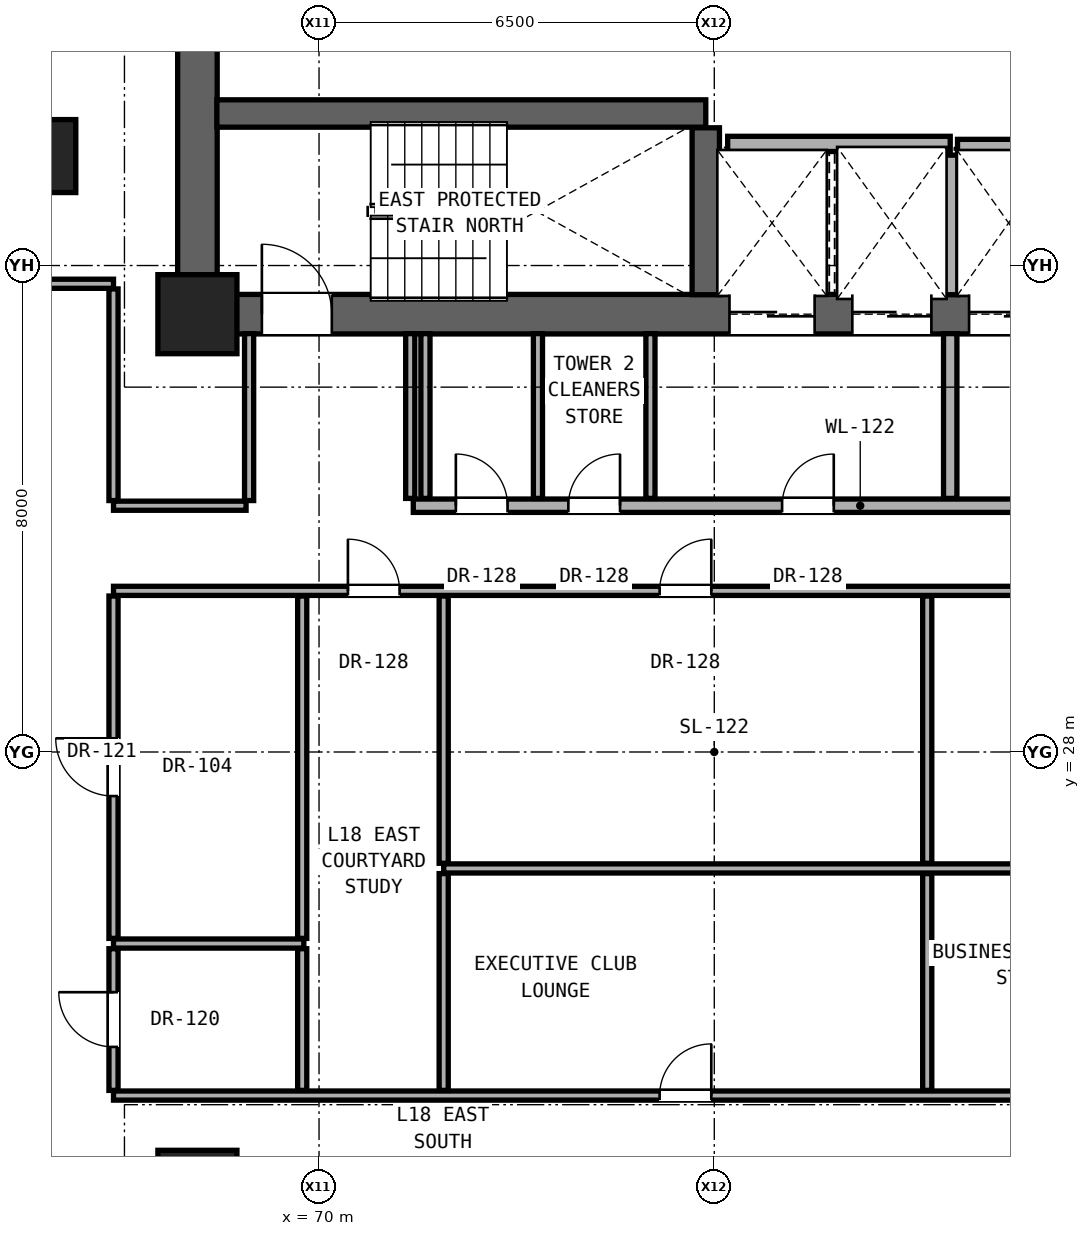
"""IFC4 building model, lengths in metres.
Left out: names, types, materials, properties, quantities, classifications, styles, units other than length and angle.
Written with IfcOpenShell. Run it as: python <this file> out.ifc"""

import sys

from ifc_helpers import new_model, si_unit, direction, frame, frame_2d, origin, origin_2d, place, context, subcontext, project, spatial, rectangle, extrude, element, fill, save


model = new_model("IFC4")
c1 = context("Model", 3, precision=1e-05, world=origin(), true_north=direction((0.0, 1.0)))
c2 = subcontext(c1, "Body", "Model", "MODEL_VIEW")
j1 = project(units=[si_unit("LENGTHUNIT", "METRE"), si_unit("PLANEANGLEUNIT", "RADIAN")], contexts=[c1])
p1 = place(None, origin())
s1 = spatial("IfcSite", under=j1, at=p1, CompositionType="ELEMENT")
p2 = place(p1, origin())
s2 = spatial("IfcBuilding", under=s1, at=p2, CompositionType="ELEMENT")
p3 = place(p2, frame((0.0, 0.0, 65.3)))
s3 = spatial("IfcBuildingStorey", under=s2, at=p3, CompositionType="ELEMENT", Elevation=65.3)
for number, where, z_axis, x_axis in (
    (1, (68.0, 20.8, 0.0), (0.0, 0.0, 1.0), (1.0, 0.0, 0.0)),
    (2, (68.0, 35.2, 0.0), (0.0, 0.0, 1.0), (1.0, 0.0, 0.0)),
):
    element("IfcColumn", number, at=place(p3, frame(where, z_axis=z_axis, x_axis=x_axis)), inside=s3, PredefinedType="COLUMN", context=c2, shape_type="SweptSolid", body=[
        extrude(rectangle(XDim=1.3, YDim=1.3, at=origin_2d()), origin(), (0.0, 0.0, 1.0), 3.3),
    ])
p4 = place(p3, frame((65.6, 37.8, 0.0), z_axis=(0.0, 0.0, 1.0), x_axis=(1.0, 0.0, 0.0)))
e3 = element("IfcColumn", 3, at=p4, inside=s3, PredefinedType="PILASTER", context=c2, shape_type="SweptSolid", body=[
    extrude(rectangle(XDim=0.8, YDim=1.2, at=origin_2d()), origin(), (0.0, 0.0, 1.0), 3.3),
])
p5 = place(p3, frame((68.0, 35.2, 0.0), z_axis=(0.0, 0.0, 1.0), x_axis=(0.0, 1.0, 0.0)))
e4 = element("IfcWall", 4, at=p5, inside=s3, PredefinedType="SHEAR", context=c2, shape_type="SweptSolid", body=[
    extrude(rectangle(XDim=5.6, YDim=0.65, at=frame_2d((2.8, 0.0))), origin(), (0.0, 0.0, 1.0), 3.06),
])
p6 = place(p3, frame((68.0, 35.2, 0.0), z_axis=(0.0, 0.0, 1.0), x_axis=(1.0, 0.0, 0.0)))
e5 = element("IfcWall", 5, at=p6, inside=s3, PredefinedType="SHEAR", context=c2, shape_type="SweptSolid", body=[
    extrude(rectangle(XDim=17.0, YDim=0.65, at=frame_2d((8.5, 0.0))), origin(), (0.0, 0.0, 1.0), 3.06),
])
p7 = place(p6, frame((1.06, 0.0, 0.0)))
e6 = element("IfcOpeningElement", 6, at=p7, cuts=e5, PredefinedType="OPENING", context=c2, shape_type="SweptSolid", body=[
    extrude(rectangle(XDim=1.15, YDim=2.2, at=frame_2d((0.575, 1.1))), frame((0.0, 0.335, 0.0), z_axis=(0.0, -1.0, 0.0), x_axis=(1.0, 0.0, 0.0)), (0.0, 0.0, 1.0), 0.67),
])
p8 = place(p6, frame((8.75, 0.0, 0.0)))
e7 = element("IfcOpeningElement", 7, at=p8, cuts=e5, PredefinedType="OPENING", context=c2, shape_type="SweptSolid", body=[
    extrude(rectangle(XDim=1.4, YDim=2.35, at=frame_2d((0.7, 1.175))), frame((0.0, 0.335, 0.0), z_axis=(0.0, -1.0, 0.0), x_axis=(1.0, 0.0, 0.0)), (0.0, 0.0, 1.0), 0.67),
])
p9 = place(p6, frame((10.77, 0.0, 0.0)))
e8 = element("IfcOpeningElement", 8, at=p9, cuts=e5, PredefinedType="OPENING", context=c2, shape_type="SweptSolid", body=[
    extrude(rectangle(XDim=1.3, YDim=2.3, at=frame_2d((0.65, 1.15))), frame((0.0, 0.335, 0.0), z_axis=(0.0, -1.0, 0.0), x_axis=(1.0, 0.0, 0.0)), (0.0, 0.0, 1.0), 0.67),
])
p10 = place(p6, frame((12.69, 0.0, 0.0)))
e9 = element("IfcOpeningElement", 9, at=p10, cuts=e5, PredefinedType="OPENING", context=c2, shape_type="SweptSolid", body=[
    extrude(rectangle(XDim=1.3, YDim=2.3, at=frame_2d((0.65, 1.15))), frame((0.0, 0.335, 0.0), z_axis=(0.0, -1.0, 0.0), x_axis=(1.0, 0.0, 0.0)), (0.0, 0.0, 1.0), 0.67),
])
p11 = place(p6, frame((14.57, 0.0, 0.0)))
e10 = element("IfcOpeningElement", 10, at=p11, cuts=e5, PredefinedType="OPENING", context=c2, shape_type="SweptSolid", body=[
    extrude(rectangle(XDim=1.3, YDim=2.3, at=frame_2d((0.65, 1.15))), frame((0.0, 0.335, 0.0), z_axis=(0.0, -1.0, 0.0), x_axis=(1.0, 0.0, 0.0)), (0.0, 0.0, 1.0), 0.67),
])
p12 = place(p3, frame((66.62, 22.35, 0.0), z_axis=(0.0, 0.0, 1.0), x_axis=(1.0, 0.0, 0.0)))
e11 = element("IfcWall", 11, at=p12, inside=s3, PredefinedType="PARTITIONING", context=c2, shape_type="SweptSolid", body=[
    extrude(rectangle(XDim=19.63, YDim=0.15, at=frame_2d((9.815, 0.0))), origin(), (0.0, 0.0, 1.0), 2.125),
])
p13 = place(p12, frame((8.981, 0.0, 0.0)))
e12 = element("IfcOpeningElement", 12, at=p13, cuts=e11, PredefinedType="OPENING", context=c2, shape_type="SweptSolid", body=[
    extrude(rectangle(XDim=0.85, YDim=2.01, at=frame_2d((0.425, 1.005))), frame((0.0, 0.085, 0.0), z_axis=(0.0, -1.0, 0.0), x_axis=(1.0, 0.0, 0.0)), (0.0, 0.0, 1.0), 0.17),
])
p14 = place(p12, frame((16.061, 0.0, 0.0)))
e13 = element("IfcOpeningElement", 13, at=p14, cuts=e11, PredefinedType="OPENING", context=c2, shape_type="SweptSolid", body=[
    extrude(rectangle(XDim=0.85, YDim=2.01, at=frame_2d((0.425, 1.005))), frame((0.0, 0.085, 0.0), z_axis=(0.0, -1.0, 0.0), x_axis=(1.0, 0.0, 0.0)), (0.0, 0.0, 1.0), 0.17),
])
p15 = place(p3, frame((66.62, 24.85, 0.0), z_axis=(0.0, 0.0, 1.0), x_axis=(1.0, 0.0, 0.0)))
e14 = element("IfcWall", 14, at=p15, inside=s3, PredefinedType="PARTITIONING", context=c2, shape_type="SweptSolid", body=[
    extrude(rectangle(XDim=3.13, YDim=0.15, at=frame_2d((1.565, 0.0))), origin(), (0.0, 0.0, 1.0), 2.125),
])
p16 = place(p3, frame((72.05, 26.085, 0.0), z_axis=(0.0, 0.0, 1.0), x_axis=(1.0, 0.0, 0.0)))
e15 = element("IfcWall", 15, at=p16, inside=s3, PredefinedType="PARTITIONING", context=c2, shape_type="SweptSolid", body=[
    extrude(rectangle(XDim=14.2, YDim=0.15, at=frame_2d((7.1, 0.0))), origin(), (0.0, 0.0, 1.0), 2.125),
])
p17 = place(p3, frame((66.62, 30.65, 0.0), z_axis=(0.0, 0.0, 1.0), x_axis=(1.0, 0.0, 0.0)))
e16 = element("IfcWall", 16, at=p17, inside=s3, PredefinedType="PARTITIONING", context=c2, shape_type="SweptSolid", body=[
    extrude(rectangle(XDim=19.63, YDim=0.15, at=frame_2d((9.815, 0.0))), origin(), (0.0, 0.0, 1.0), 2.125),
])
p18 = place(p17, frame((3.855, 0.0, 0.0)))
e17 = element("IfcOpeningElement", 17, at=p18, cuts=e16, PredefinedType="OPENING", context=c2, shape_type="SweptSolid", body=[
    extrude(rectangle(XDim=0.85, YDim=2.01, at=frame_2d((0.425, 1.005))), frame((0.0, 0.085, 0.0), z_axis=(0.0, -1.0, 0.0), x_axis=(1.0, 0.0, 0.0)), (0.0, 0.0, 1.0), 0.17),
])
p19 = place(p17, frame((8.981, 0.0, 0.0)))
e18 = element("IfcOpeningElement", 18, at=p19, cuts=e16, PredefinedType="OPENING", context=c2, shape_type="SweptSolid", body=[
    extrude(rectangle(XDim=0.85, YDim=2.01, at=frame_2d((0.425, 1.005))), frame((0.0, 0.085, 0.0), z_axis=(0.0, -1.0, 0.0), x_axis=(1.0, 0.0, 0.0)), (0.0, 0.0, 1.0), 0.17),
])
p20 = place(p17, frame((16.061, 0.0, 0.0)))
e19 = element("IfcOpeningElement", 19, at=p20, cuts=e16, PredefinedType="OPENING", context=c2, shape_type="SweptSolid", body=[
    extrude(rectangle(XDim=0.85, YDim=2.01, at=frame_2d((0.425, 1.005))), frame((0.0, 0.085, 0.0), z_axis=(0.0, -1.0, 0.0), x_axis=(1.0, 0.0, 0.0)), (0.0, 0.0, 1.0), 0.17),
])
p21 = place(p3, frame((66.62, 32.05, 0.0), z_axis=(0.0, 0.0, 1.0), x_axis=(1.0, 0.0, 0.0)))
e20 = element("IfcWall", 20, at=p21, inside=s3, PredefinedType="PARTITIONING", context=c2, shape_type="SweptSolid", body=[
    extrude(rectangle(XDim=2.18, YDim=0.15, at=frame_2d((1.09, 0.0))), origin(), (0.0, 0.0, 1.0), 2.125),
])
p22 = place(p3, frame((71.55, 32.05, 0.0), z_axis=(0.0, 0.0, 1.0), x_axis=(1.0, 0.0, 0.0)))
e21 = element("IfcWall", 21, at=p22, inside=s3, PredefinedType="SOLIDWALL", context=c2, shape_type="SweptSolid", body=[
    extrude(rectangle(XDim=14.7, YDim=0.22, at=frame_2d((7.35, 0.0))), origin(), (0.0, 0.0, 1.0), 2.125),
])
p23 = place(p22, frame((11.39, 0.0, 0.0)))
e22 = element("IfcOpeningElement", 22, at=p23, cuts=e21, PredefinedType="OPENING", context=c2, shape_type="SweptSolid", body=[
    extrude(rectangle(XDim=0.85, YDim=2.01, at=frame_2d((0.425, 1.005))), frame((0.0, 0.12, 0.0), z_axis=(0.0, -1.0, 0.0), x_axis=(1.0, 0.0, 0.0)), (0.0, 0.0, 1.0), 0.24),
])
p24 = place(p22, frame((6.065, 0.0, 0.0)))
e23 = element("IfcOpeningElement", 23, at=p24, cuts=e21, PredefinedType="OPENING", context=c2, shape_type="SweptSolid", body=[
    extrude(rectangle(XDim=0.85, YDim=2.01, at=frame_2d((0.425, 1.005))), frame((0.0, 0.12, 0.0), z_axis=(0.0, -1.0, 0.0), x_axis=(1.0, 0.0, 0.0)), (0.0, 0.0, 1.0), 0.24),
])
p25 = place(p22, frame((0.7, 0.0, 0.0)))
e24 = element("IfcOpeningElement", 24, at=p25, cuts=e21, PredefinedType="OPENING", context=c2, shape_type="SweptSolid", body=[
    extrude(rectangle(XDim=0.85, YDim=2.01, at=frame_2d((0.425, 1.005))), frame((0.0, 0.12, 0.0), z_axis=(0.0, -1.0, 0.0), x_axis=(1.0, 0.0, 0.0)), (0.0, 0.0, 1.0), 0.24),
])
p26 = place(p22, frame((2.55, 0.0, 0.0)))
e25 = element("IfcOpeningElement", 25, at=p26, cuts=e21, PredefinedType="OPENING", context=c2, shape_type="SweptSolid", body=[
    extrude(rectangle(XDim=0.85, YDim=2.01, at=frame_2d((0.425, 1.005))), frame((0.0, 0.12, 0.0), z_axis=(0.0, -1.0, 0.0), x_axis=(1.0, 0.0, 0.0)), (0.0, 0.0, 1.0), 0.24),
])
p27 = place(p3, frame((65.25, 35.7, 0.0), z_axis=(0.0, 0.0, 1.0), x_axis=(1.0, 0.0, 0.0)))
e26 = element("IfcWall", 26, at=p27, inside=s3, PredefinedType="PARTITIONING", context=c2, shape_type="SweptSolid", body=[
    extrude(rectangle(XDim=1.37, YDim=0.15, at=frame_2d((0.685, 0.0))), origin(), (0.0, 0.0, 1.0), 3.06),
])
p28 = place(p3, frame((80.5, 37.95, 0.0), z_axis=(0.0, 0.0, 1.0), x_axis=(1.0, 0.0, 0.0)))
e27 = element("IfcWall", 27, at=p28, inside=s3, PredefinedType="SOLIDWALL", context=c2, shape_type="SweptSolid", body=[
    extrude(rectangle(XDim=3.65, YDim=0.25, at=frame_2d((1.825, 0.0))), origin(), (0.0, 0.0, 1.0), 3.06),
])
p29 = place(p3, frame((76.72, 38.0, 0.0), z_axis=(0.0, 0.0, 1.0), x_axis=(1.0, 0.0, 0.0)))
e28 = element("IfcWall", 28, at=p29, inside=s3, PredefinedType="SOLIDWALL", context=c2, shape_type="SweptSolid", body=[
    extrude(rectangle(XDim=3.66, YDim=0.25, at=frame_2d((1.83, 0.0))), origin(), (0.0, 0.0, 1.0), 3.06),
])
p30 = place(p3, frame((68.32, 38.5, 0.0), z_axis=(0.0, 0.0, 1.0), x_axis=(1.0, 0.0, 0.0)))
e29 = element("IfcWall", 29, at=p30, inside=s3, PredefinedType="SHEAR", context=c2, shape_type="SweptSolid", body=[
    extrude(rectangle(XDim=8.04, YDim=0.45, at=frame_2d((4.02, 0.0))), origin(), (0.0, 0.0, 1.0), 3.06),
])
p31 = place(p3, frame((66.62, 22.435, 0.0), z_axis=(0.0, 0.0, 1.0), x_axis=(0.0, 1.0, 0.0)))
e30 = element("IfcWall", 30, at=p31, inside=s3, PredefinedType="PARTITIONING", context=c2, shape_type="SweptSolid", body=[
    extrude(rectangle(XDim=2.33, YDim=0.15, at=frame_2d((1.165, 0.0))), origin(), (0.0, 0.0, 1.0), 3.06),
])
p32 = place(p31, frame((0.715, 0.0, 0.0)))
e31 = element("IfcOpeningElement", 31, at=p32, cuts=e30, PredefinedType="OPENING", context=c2, shape_type="SweptSolid", body=[
    extrude(rectangle(XDim=0.9, YDim=2.1, at=frame_2d((0.45, 1.05))), frame((0.0, 0.085, 0.0), z_axis=(0.0, -1.0, 0.0), x_axis=(1.0, 0.0, 0.0)), (0.0, 0.0, 1.0), 0.17),
])
p33 = place(p3, frame((66.62, 24.935, 0.0), z_axis=(0.0, 0.0, 1.0), x_axis=(0.0, 1.0, 0.0)))
e32 = element("IfcWall", 32, at=p33, inside=s3, PredefinedType="PARTITIONING", context=c2, shape_type="SweptSolid", body=[
    extrude(rectangle(XDim=5.63, YDim=0.15, at=frame_2d((2.815, 0.0))), origin(), (0.0, 0.0, 1.0), 2.279),
])
p34 = place(p33, frame((2.34, 0.0, 0.0)))
e33 = element("IfcOpeningElement", 33, at=p34, cuts=e32, PredefinedType="OPENING", context=c2, shape_type="SweptSolid", body=[
    extrude(rectangle(XDim=0.95, YDim=2.15, at=frame_2d((0.475, 1.075))), frame((0.0, 0.085, 0.0), z_axis=(0.0, -1.0, 0.0), x_axis=(1.0, 0.0, 0.0)), (0.0, 0.0, 1.0), 0.17),
])
p35 = place(p3, frame((66.62, 32.135, 0.0), z_axis=(0.0, 0.0, 1.0), x_axis=(0.0, 1.0, 0.0)))
e34 = element("IfcWall", 34, at=p35, inside=s3, PredefinedType="PARTITIONING", context=c2, shape_type="SweptSolid", body=[
    extrude(rectangle(XDim=3.48, YDim=0.15, at=frame_2d((1.74, 0.0))), origin(), (0.0, 0.0, 1.0), 2.452),
])
p36 = place(p3, frame((68.85, 32.135, 0.0), z_axis=(0.0, 0.0, 1.0), x_axis=(0.0, 1.0, 0.0)))
e35 = element("IfcWall", 35, at=p36, inside=s3, PredefinedType="PARTITIONING", context=c2, shape_type="SweptSolid", body=[
    extrude(rectangle(XDim=2.745, YDim=0.15, at=frame_2d((1.373, 0.0))), origin(), (0.0, 0.0, 1.0), 3.06),
])
p37 = place(p3, frame((69.723, 22.435, 0.0), z_axis=(0.0, 0.0, 1.0), x_axis=(0.0, 1.0, 0.0)))
e36 = element("IfcWall", 36, at=p37, inside=s3, PredefinedType="PARTITIONING", context=c2, shape_type="SweptSolid", body=[
    extrude(rectangle(XDim=2.33, YDim=0.15, at=frame_2d((1.165, 0.0))), origin(), (0.0, 0.0, 1.0), 3.06),
])
p38 = place(p3, frame((69.723, 24.935, 0.0), z_axis=(0.0, 0.0, 1.0), x_axis=(0.0, 1.0, 0.0)))
e37 = element("IfcWall", 37, at=p38, inside=s3, PredefinedType="PARTITIONING", context=c2, shape_type="SweptSolid", body=[
    extrude(rectangle(XDim=5.63, YDim=0.15, at=frame_2d((2.815, 0.0))), origin(), (0.0, 0.0, 1.0), 2.125),
])
for number, where, z_axis, x_axis in (
    (38, (71.5, 32.17, 0.0), (0.0, 0.0, 1.0), (0.0, 1.0, 0.0)),
    (39, (71.75, 32.17, 0.0), (0.0, 0.0, 1.0), (0.0, 1.0, 0.0)),
):
    element("IfcWall", number, at=place(p3, frame(where, z_axis=z_axis, x_axis=x_axis)), inside=s3, PredefinedType="PARTITIONING", context=c2, shape_type="SweptSolid", body=[
        extrude(rectangle(XDim=2.71, YDim=0.15, at=frame_2d((1.355, 0.0))), origin(), (0.0, 0.0, 1.0), 3.06),
    ])
p39 = place(p3, frame((72.05, 22.435, 0.0), z_axis=(0.0, 0.0, 1.0), x_axis=(0.0, 1.0, 0.0)))
e40 = element("IfcWall", 40, at=p39, inside=s3, PredefinedType="PARTITIONING", context=c2, shape_type="SweptSolid", body=[
    extrude(rectangle(XDim=3.565, YDim=0.15, at=frame_2d((1.782, 0.0))), origin(), (0.0, 0.0, 1.0), 2.589),
])
p40 = place(p3, frame((72.05, 26.17, 0.0), z_axis=(0.0, 0.0, 1.0), x_axis=(0.0, 1.0, 0.0)))
e41 = element("IfcWall", 41, at=p40, inside=s3, PredefinedType="PARTITIONING", context=c2, shape_type="SweptSolid", body=[
    extrude(rectangle(XDim=4.395, YDim=0.15, at=frame_2d((2.198, 0.0))), origin(), (0.0, 0.0, 1.0), 2.125),
])
for number, where, z_axis, x_axis in (
    (42, (73.6, 32.17, 0.0), (0.0, 0.0, 1.0), (0.0, 1.0, 0.0)),
    (43, (75.45, 32.17, 0.0), (0.0, 0.0, 1.0), (0.0, 1.0, 0.0)),
):
    element("IfcWall", number, at=place(p3, frame(where, z_axis=z_axis, x_axis=x_axis)), inside=s3, PredefinedType="PARTITIONING", context=c2, shape_type="SweptSolid", body=[
        extrude(rectangle(XDim=2.71, YDim=0.15, at=frame_2d((1.355, 0.0))), origin(), (0.0, 0.0, 1.0), 3.06),
    ])
p41 = place(p3, frame((76.36, 35.52, 0.0), z_axis=(0.0, 0.0, 1.0), x_axis=(0.0, 1.0, 0.0)))
e44 = element("IfcWall", 44, at=p41, inside=s3, PredefinedType="SHEAR", context=c2, shape_type="SweptSolid", body=[
    extrude(rectangle(XDim=2.745, YDim=0.45, at=frame_2d((1.373, 0.0))), origin(), (0.0, 0.0, 1.0), 3.06),
])
p42 = place(p3, frame((80.002, 22.435, 0.0), z_axis=(0.0, 0.0, 1.0), x_axis=(0.0, 1.0, 0.0)))
e45 = element("IfcWall", 45, at=p42, inside=s3, PredefinedType="PARTITIONING", context=c2, shape_type="SweptSolid", body=[
    extrude(rectangle(XDim=3.565, YDim=0.15, at=frame_2d((1.782, 0.0))), origin(), (0.0, 0.0, 1.0), 3.06),
])
p43 = place(p3, frame((80.002, 26.17, 0.0), z_axis=(0.0, 0.0, 1.0), x_axis=(0.0, 1.0, 0.0)))
e46 = element("IfcWall", 46, at=p43, inside=s3, PredefinedType="PARTITIONING", context=c2, shape_type="SweptSolid", body=[
    extrude(rectangle(XDim=4.395, YDim=0.15, at=frame_2d((2.198, 0.0))), origin(), (0.0, 0.0, 1.0), 2.125),
])
p44 = place(p3, frame((80.38, 32.17, 0.0), z_axis=(0.0, 0.0, 1.0), x_axis=(0.0, 1.0, 0.0)))
e47 = element("IfcWall", 47, at=p44, inside=s3, PredefinedType="SOLIDWALL", context=c2, shape_type="SweptSolid", body=[
    extrude(rectangle(XDim=2.71, YDim=0.22, at=frame_2d((1.355, 0.0))), origin(), (0.0, 0.0, 1.0), 3.06),
])
p45 = place(p3, frame((80.38, 35.52, 0.0), z_axis=(0.0, 0.0, 1.0), x_axis=(0.0, 1.0, 0.0)))
e48 = element("IfcWall", 48, at=p45, inside=s3, PredefinedType="SOLIDWALL", context=c2, shape_type="SweptSolid", body=[
    extrude(rectangle(XDim=2.295, YDim=0.25, at=frame_2d((1.147, 0.0))), origin(), (0.0, 0.0, 1.0), 3.06),
])
p46 = place(p7, origin())
e49 = element("IfcDoor", 49, at=p46, inside=s3, OperationType="SINGLE_SWING_LEFT", PredefinedType="DOOR", context=c2, shape_type="SweptSolid", body=[
    extrude(rectangle(XDim=1.15, YDim=2.2, at=frame_2d((0.575, 1.1))), frame((0.0, 0.025, 0.0), z_axis=(0.0, -1.0, 0.0), x_axis=(1.0, 0.0, 0.0)), (0.0, 0.0, 1.0), 0.05),
])
fill(e6, e49)
p47 = place(p24, origin())
e50 = element("IfcDoor", 50, at=p47, inside=s3, OperationType="SINGLE_SWING_RIGHT", PredefinedType="DOOR", context=c2, shape_type="SweptSolid", body=[
    extrude(rectangle(XDim=0.85, YDim=2.01, at=frame_2d((0.425, 1.005))), frame((0.0, 0.025, 0.0), z_axis=(0.0, -1.0, 0.0), x_axis=(1.0, 0.0, 0.0)), (0.0, 0.0, 1.0), 0.05),
])
fill(e23, e50)
p48 = place(p25, origin())
e51 = element("IfcDoor", 51, at=p48, inside=s3, OperationType="SINGLE_SWING_LEFT", PredefinedType="DOOR", context=c2, shape_type="SweptSolid", body=[
    extrude(rectangle(XDim=0.85, YDim=2.01, at=frame_2d((0.425, 1.005))), frame((0.0, 0.025, 0.0), z_axis=(0.0, -1.0, 0.0), x_axis=(1.0, 0.0, 0.0)), (0.0, 0.0, 1.0), 0.05),
])
fill(e24, e51)
p49 = place(p26, origin())
e52 = element("IfcDoor", 52, at=p49, inside=s3, OperationType="SINGLE_SWING_RIGHT", PredefinedType="DOOR", context=c2, shape_type="SweptSolid", body=[
    extrude(rectangle(XDim=0.85, YDim=2.01, at=frame_2d((0.425, 1.005))), frame((0.0, 0.025, 0.0), z_axis=(0.0, -1.0, 0.0), x_axis=(1.0, 0.0, 0.0)), (0.0, 0.0, 1.0), 0.05),
])
fill(e25, e52)
p50 = place(p32, origin())
e53 = element("IfcDoor", 53, at=p50, inside=s3, OperationType="SINGLE_SWING_RIGHT", PredefinedType="DOOR", context=c2, shape_type="SweptSolid", body=[
    extrude(rectangle(XDim=0.9, YDim=2.1, at=frame_2d((0.45, 1.05))), frame((0.0, 0.025, 0.0), z_axis=(0.0, -1.0, 0.0), x_axis=(1.0, 0.0, 0.0)), (0.0, 0.0, 1.0), 0.05),
])
fill(e31, e53)
p51 = place(p34, origin())
e54 = element("IfcDoor", 54, at=p51, inside=s3, OperationType="SINGLE_SWING_RIGHT", PredefinedType="DOOR", context=c2, shape_type="SweptSolid", body=[
    extrude(rectangle(XDim=0.95, YDim=2.15, at=frame_2d((0.475, 1.075))), frame((0.0, 0.025, 0.0), z_axis=(0.0, -1.0, 0.0), x_axis=(1.0, 0.0, 0.0)), (0.0, 0.0, 1.0), 0.05),
])
fill(e33, e54)
p52 = place(p18, origin())
e55 = element("IfcDoor", 55, at=p52, inside=s3, OperationType="SINGLE_SWING_LEFT", PredefinedType="DOOR", context=c2, shape_type="SweptSolid", body=[
    extrude(rectangle(XDim=0.85, YDim=2.01, at=frame_2d((0.425, 1.005))), frame((0.0, 0.025, 0.0), z_axis=(0.0, -1.0, 0.0), x_axis=(1.0, 0.0, 0.0)), (0.0, 0.0, 1.0), 0.05),
])
fill(e17, e55)
p53 = place(p13, origin())
e56 = element("IfcDoor", 56, at=p53, inside=s3, OperationType="SINGLE_SWING_RIGHT", PredefinedType="DOOR", context=c2, shape_type="SweptSolid", body=[
    extrude(rectangle(XDim=0.85, YDim=2.01, at=frame_2d((0.425, 1.005))), frame((0.0, 0.025, 0.0), z_axis=(0.0, -1.0, 0.0), x_axis=(1.0, 0.0, 0.0)), (0.0, 0.0, 1.0), 0.05),
])
fill(e12, e56)
p54 = place(p19, origin())
e57 = element("IfcDoor", 57, at=p54, inside=s3, OperationType="SINGLE_SWING_RIGHT", PredefinedType="DOOR", context=c2, shape_type="SweptSolid", body=[
    extrude(rectangle(XDim=0.85, YDim=2.01, at=frame_2d((0.425, 1.005))), frame((0.0, 0.025, 0.0), z_axis=(0.0, -1.0, 0.0), x_axis=(1.0, 0.0, 0.0)), (0.0, 0.0, 1.0), 0.05),
])
fill(e18, e57)
p55 = place(p8, origin())
e58 = element("IfcDoor", 58, at=p55, inside=s3, OperationType="DOUBLE_DOOR_SLIDING", PredefinedType="DOOR", context=c2, shape_type="SweptSolid", body=[
    extrude(rectangle(XDim=1.4, YDim=2.35, at=frame_2d((0.7, 1.175))), frame((0.0, 0.025, 0.0), z_axis=(0.0, -1.0, 0.0), x_axis=(1.0, 0.0, 0.0)), (0.0, 0.0, 1.0), 0.05),
])
fill(e7, e58)
p56 = place(p9, origin())
e59 = element("IfcDoor", 59, at=p56, inside=s3, OperationType="DOUBLE_DOOR_SLIDING", PredefinedType="DOOR", context=c2, shape_type="SweptSolid", body=[
    extrude(rectangle(XDim=1.3, YDim=2.3, at=frame_2d((0.65, 1.15))), frame((0.0, 0.025, 0.0), z_axis=(0.0, -1.0, 0.0), x_axis=(1.0, 0.0, 0.0)), (0.0, 0.0, 1.0), 0.05),
])
fill(e8, e59)
p57 = place(p10, origin())
e60 = element("IfcDoor", 60, at=p57, inside=s3, OperationType="DOUBLE_DOOR_SLIDING", PredefinedType="DOOR", context=c2, shape_type="SweptSolid", body=[
    extrude(rectangle(XDim=1.3, YDim=2.3, at=frame_2d((0.65, 1.15))), frame((0.0, 0.025, 0.0), z_axis=(0.0, -1.0, 0.0), x_axis=(1.0, 0.0, 0.0)), (0.0, 0.0, 1.0), 0.05),
])
fill(e9, e60)
save(model, sys.argv[1])
